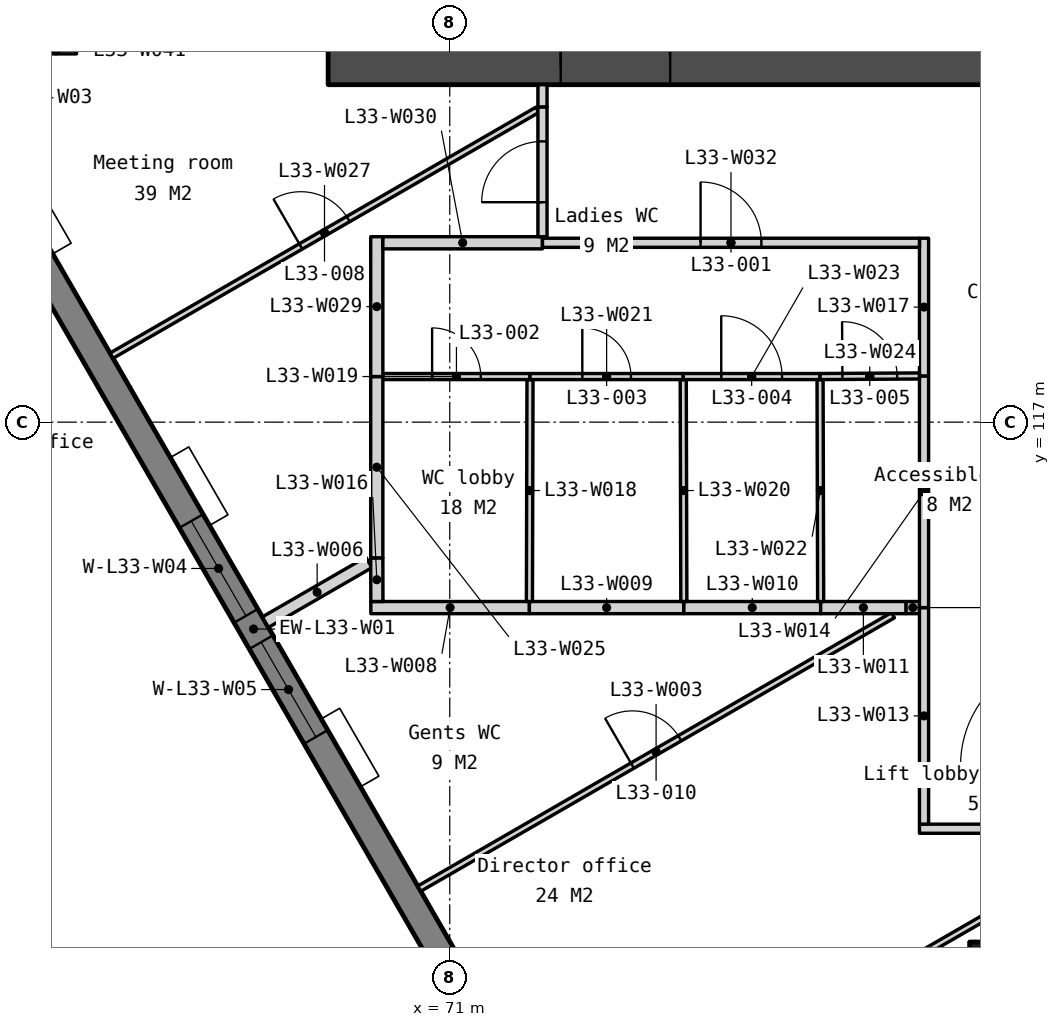
"""IFC4 building model, lengths in metres.
Left out: names, types, materials, properties, quantities, classifications, styles, units other than length and angle.
Written with IfcOpenShell. Run it as: python <this file> out.ifc"""

import sys

from ifc_helpers import new_model, si_unit, direction, frame, frame_2d, origin, origin_2d, place, context, subcontext, project, spatial, polyline, rectangle, outline, extrude, element, fill, save


model = new_model("IFC4")
c1 = context("Model", 3, precision=1e-05, world=origin(), true_north=direction((0.0, 1.0)))
c2 = subcontext(c1, "Body", "Model", "MODEL_VIEW")
j1 = project(units=[si_unit("LENGTHUNIT", "METRE"), si_unit("PLANEANGLEUNIT", "RADIAN")], contexts=[c1])
p1 = place(None, origin())
s1 = spatial("IfcSite", under=j1, at=p1, CompositionType="ELEMENT")
p2 = place(p1, origin())
s2 = spatial("IfcBuilding", under=s1, at=p2, CompositionType="ELEMENT")
p3 = place(p2, frame((0.0, 0.0, 132.5)))
s3 = spatial("IfcBuildingStorey", under=s2, at=p3, CompositionType="ELEMENT", Elevation=132.5)
p4 = place(p3, frame((80.0, 108.0, 0.0), z_axis=(0.0, 0.0, 1.0), x_axis=(1.0, 0.0, 0.0)))
e1 = element("IfcColumn", 1, at=p4, inside=s3, PredefinedType="COLUMN", context=c2, shape_type="SweptSolid", body=[
    extrude(rectangle(XDim=0.9, YDim=0.9, at=origin_2d()), origin(), (0.0, 0.0, 1.0), 3.9),
])
p5 = place(p3, frame((69.0, 122.85, 0.0), z_axis=(0.0, 0.0, 1.0), x_axis=(1.0, 0.0, 0.0)))
e2 = element("IfcWall", 2, at=p5, inside=s3, PredefinedType="SOLIDWALL", context=c2, shape_type="SweptSolid", body=[
    extrude(rectangle(XDim=22.0, YDim=0.6, at=frame_2d((11.0, 0.0))), origin(), (0.0, 0.0, 1.0), 3.75),
])
p6 = place(p5, frame((16.375, 0.0, 0.0)))
e3 = element("IfcOpeningElement", 3, at=p6, cuts=e2, PredefinedType="OPENING", context=c2, shape_type="SweptSolid", body=[
    extrude(rectangle(XDim=1.8, YDim=2.1, at=frame_2d((0.9, 1.05))), frame((0.0, 0.31, 0.0), z_axis=(0.0, -1.0, 0.0), x_axis=(1.0, 0.0, 0.0)), (0.0, 0.0, 1.0), 0.62),
])
p7 = place(p5, frame((3.825, 0.0, 0.0)))
e4 = element("IfcOpeningElement", 4, at=p7, cuts=e2, PredefinedType="OPENING", context=c2, shape_type="SweptSolid", body=[
    extrude(rectangle(XDim=1.8, YDim=2.1, at=frame_2d((0.9, 1.05))), frame((0.0, 0.31, 0.0), z_axis=(0.0, -1.0, 0.0), x_axis=(1.0, 0.0, 0.0)), (0.0, 0.0, 1.0), 0.62),
])
p8 = place(p5, frame((12.85, 0.0, 0.0)))
e5 = element("IfcOpeningElement", 5, at=p8, cuts=e2, PredefinedType="OPENING", context=c2, shape_type="SweptSolid", body=[
    extrude(rectangle(XDim=1.5, YDim=2.1, at=frame_2d((0.75, 1.05))), frame((0.0, 0.31, 0.0), z_axis=(0.0, -1.0, 0.0), x_axis=(1.0, 0.0, 0.0)), (0.0, 0.0, 1.0), 0.62),
])
p9 = place(p3, frame((57.652, 131.129, -0.15), z_axis=(0.0, 0.0, 1.0), x_axis=(0.499997369791, -0.866026922331, 0.0)))
e6 = element("IfcWall", 6, at=p9, inside=s3, PredefinedType="SOLIDWALL", context=c2, shape_type="SweptSolid", body=[
    extrude(outline(polyline([(40.486, 0.0), (40.486, 3.9), (0.0, 3.9), (0.0, 0.0), (40.486, 0.0)])), frame((0.0, 0.225, 0.0), z_axis=(0.0, -1.0, 0.0), x_axis=(1.0, 0.0, 0.0)), (0.0, 0.0, 1.0), 0.45),
])
p10 = place(p9, frame((0.837, 0.0, 0.95)))
e7 = element("IfcOpeningElement", 7, at=p10, cuts=e6, PredefinedType="OPENING", context=c2, shape_type="SweptSolid", body=[
    extrude(rectangle(XDim=1.2, YDim=2.2, at=frame_2d((0.6, 1.1))), frame((0.0, 0.235, 0.0), z_axis=(0.0, -1.0, 0.0), x_axis=(1.0, 0.0, 0.0)), (0.0, 0.0, 1.0), 0.47),
])
p11 = place(p9, frame((8.072, 0.0, 0.95)))
e8 = element("IfcOpeningElement", 8, at=p11, cuts=e6, PredefinedType="OPENING", context=c2, shape_type="SweptSolid", body=[
    extrude(rectangle(XDim=1.8, YDim=2.2, at=frame_2d((0.9, 1.1))), frame((0.0, 0.235, 0.0), z_axis=(0.0, -1.0, 0.0), x_axis=(1.0, 0.0, 0.0)), (0.0, 0.0, 1.0), 0.47),
])
p12 = place(p9, frame((10.372, 0.0, 0.95)))
e9 = element("IfcOpeningElement", 9, at=p12, cuts=e6, PredefinedType="OPENING", context=c2, shape_type="SweptSolid", body=[
    extrude(rectangle(XDim=1.8, YDim=2.2, at=frame_2d((0.9, 1.1))), frame((0.0, 0.235, 0.0), z_axis=(0.0, -1.0, 0.0), x_axis=(1.0, 0.0, 0.0)), (0.0, 0.0, 1.0), 0.47),
])
p13 = place(p9, frame((18.193, 0.0, 0.95)))
e10 = element("IfcOpeningElement", 10, at=p13, cuts=e6, PredefinedType="OPENING", context=c2, shape_type="SweptSolid", body=[
    extrude(rectangle(XDim=1.8, YDim=2.2, at=frame_2d((0.9, 1.1))), frame((0.0, 0.235, 0.0), z_axis=(0.0, -1.0, 0.0), x_axis=(1.0, 0.0, 0.0)), (0.0, 0.0, 1.0), 0.47),
])
p14 = place(p9, frame((20.493, 0.0, 0.95)))
e11 = element("IfcOpeningElement", 11, at=p14, cuts=e6, PredefinedType="OPENING", context=c2, shape_type="SweptSolid", body=[
    extrude(rectangle(XDim=1.8, YDim=2.2, at=frame_2d((0.9, 1.1))), frame((0.0, 0.235, 0.0), z_axis=(0.0, -1.0, 0.0), x_axis=(1.0, 0.0, 0.0)), (0.0, 0.0, 1.0), 0.47),
])
p15 = place(p9, frame((28.315, 0.0, 0.95)))
e12 = element("IfcOpeningElement", 12, at=p15, cuts=e6, PredefinedType="OPENING", context=c2, shape_type="SweptSolid", body=[
    extrude(rectangle(XDim=1.8, YDim=2.2, at=frame_2d((0.9, 1.1))), frame((0.0, 0.235, 0.0), z_axis=(0.0, -1.0, 0.0), x_axis=(1.0, 0.0, 0.0)), (0.0, 0.0, 1.0), 0.47),
])
p16 = place(p9, frame((30.615, 0.0, 0.95)))
e13 = element("IfcOpeningElement", 13, at=p16, cuts=e6, PredefinedType="OPENING", context=c2, shape_type="SweptSolid", body=[
    extrude(rectangle(XDim=1.8, YDim=2.2, at=frame_2d((0.9, 1.1))), frame((0.0, 0.235, 0.0), z_axis=(0.0, -1.0, 0.0), x_axis=(1.0, 0.0, 0.0)), (0.0, 0.0, 1.0), 0.47),
])
p17 = place(p9, frame((38.449, 0.0, 0.95)))
e14 = element("IfcOpeningElement", 14, at=p17, cuts=e6, PredefinedType="OPENING", context=c2, shape_type="SweptSolid", body=[
    extrude(rectangle(XDim=1.2, YDim=2.2, at=frame_2d((0.6, 1.1))), frame((0.0, 0.235, 0.0), z_axis=(0.0, -1.0, 0.0), x_axis=(1.0, 0.0, 0.0)), (0.0, 0.0, 1.0), 0.47),
])
p18 = place(p3, frame((73.029, 104.945, 0.0), z_axis=(0.0, 0.0, 1.0), x_axis=(0.866023222546, 0.500003777996, 0.0)))
e15 = element("IfcWall", 15, at=p18, inside=s3, PredefinedType="PARTITIONING", context=c2, shape_type="SweptSolid", body=[
    extrude(rectangle(XDim=7.963, YDim=0.1, at=frame_2d((3.981, 0.0))), origin(), (0.0, 0.0, 1.0), 3.75),
])
p19 = place(p3, frame((70.499, 109.327, 0.0), z_axis=(0.0, 0.0, 1.0), x_axis=(0.866019704065, 0.500009872074, 0.0)))
e16 = element("IfcWall", 16, at=p19, inside=s3, PredefinedType="PARTITIONING", context=c2, shape_type="SweptSolid", body=[
    extrude(rectangle(XDim=8.995, YDim=0.1, at=frame_2d((4.498, 0.0))), origin(), (0.0, 0.0, 1.0), 3.75),
])
p20 = place(p19, frame((4.048, 0.0, 0.0)))
e17 = element("IfcOpeningElement", 17, at=p20, cuts=e16, PredefinedType="OPENING", context=c2, shape_type="SweptSolid", body=[
    extrude(rectangle(XDim=0.9, YDim=2.1, at=frame_2d((0.45, 1.05))), frame((0.0, 0.06, 0.0), z_axis=(0.0, -1.0, 0.0), x_axis=(1.0, 0.0, 0.0)), (0.0, 0.0, 1.0), 0.12),
])
p21 = place(p3, frame((78.725, 110.313, 0.0), z_axis=(0.0, 0.0, 1.0), x_axis=(1.0, 0.0, 0.0)))
e18 = element("IfcWall", 18, at=p21, inside=s3, PredefinedType="PARTITIONING", context=c2, shape_type="SweptSolid", body=[
    extrude(rectangle(XDim=2.55, YDim=0.15, at=frame_2d((1.275, 0.0))), origin(), (0.0, 0.0, 1.0), 3.75),
])
p22 = place(p3, frame((67.968, 113.71, 0.0), z_axis=(0.0, 0.0, 1.0), x_axis=(0.866009734793, 0.500027138508, 0.0)))
e19 = element("IfcWall", 19, at=p22, inside=s3, PredefinedType="PARTITIONING", context=c2, shape_type="SweptSolid", body=[
    extrude(rectangle(XDim=1.965, YDim=0.2, at=frame_2d((0.983, 0.0))), origin(), (0.0, 0.0, 1.0), 3.75),
])
p23 = place(p3, frame((69.702, 113.95, 0.0), z_axis=(0.0, 0.0, 1.0), x_axis=(1.0, 0.0, 0.0)))
e20 = element("IfcWall", 20, at=p23, inside=s3, PredefinedType="PARTITIONING", context=c2, shape_type="SweptSolid", body=[
    extrude(rectangle(XDim=2.608, YDim=0.2, at=frame_2d((1.304, 0.0))), origin(), (0.0, 0.0, 1.0), 3.75),
])
p24 = place(p3, frame((72.31, 113.95, 0.0), z_axis=(0.0, 0.0, 1.0), x_axis=(1.0, 0.0, 0.0)))
e21 = element("IfcWall", 21, at=p24, inside=s3, PredefinedType="PARTITIONING", context=c2, shape_type="SweptSolid", body=[
    extrude(rectangle(XDim=2.54, YDim=0.2, at=frame_2d((1.27, 0.0))), origin(), (0.0, 0.0, 1.0), 3.75),
])
p25 = place(p3, frame((74.85, 113.95, 0.0), z_axis=(0.0, 0.0, 1.0), x_axis=(1.0, 0.0, 0.0)))
e22 = element("IfcWall", 22, at=p25, inside=s3, PredefinedType="PARTITIONING", context=c2, shape_type="SweptSolid", body=[
    extrude(rectangle(XDim=2.25, YDim=0.2, at=frame_2d((1.125, 0.0))), origin(), (0.0, 0.0, 1.0), 3.75),
])
p26 = place(p3, frame((77.1, 113.95, 0.0), z_axis=(0.0, 0.0, 1.0), x_axis=(1.0, 0.0, 0.0)))
e23 = element("IfcWall", 23, at=p26, inside=s3, PredefinedType="PARTITIONING", context=c2, shape_type="SweptSolid", body=[
    extrude(rectangle(XDim=1.405, YDim=0.2, at=frame_2d((0.702, 0.0))), origin(), (0.0, 0.0, 1.0), 3.75),
])
p27 = place(p3, frame((78.505, 113.95, 0.0), z_axis=(0.0, 0.0, 1.0), x_axis=(1.0, 0.0, 0.0)))
e24 = element("IfcWall", 24, at=p27, inside=s3, PredefinedType="PARTITIONING", context=c2, shape_type="SweptSolid", body=[
    extrude(rectangle(XDim=0.22, YDim=0.2, at=frame_2d((0.11, 0.0))), origin(), (0.0, 0.0, 1.0), 3.75),
])
p28 = place(p3, frame((78.8, 110.388, 0.0), z_axis=(0.0, 0.0, 1.0), x_axis=(0.0, 1.0, 0.0)))
e25 = element("IfcWall", 25, at=p28, inside=s3, PredefinedType="PARTITIONING", context=c2, shape_type="SweptSolid", body=[
    extrude(rectangle(XDim=3.562, YDim=0.15, at=frame_2d((1.781, 0.0))), origin(), (0.0, 0.0, 1.0), 3.75),
])
p29 = place(p3, frame((78.8, 113.95, 0.0), z_axis=(0.0, 0.0, 1.0), x_axis=(0.0, 1.0, 0.0)))
e26 = element("IfcWall", 26, at=p29, inside=s3, PredefinedType="PARTITIONING", context=c2, shape_type="SweptSolid", body=[
    extrude(rectangle(XDim=3.81, YDim=0.15, at=frame_2d((1.905, 0.0))), origin(), (0.0, 0.0, 1.0), 3.75),
])
p30 = place(p3, frame((69.802, 114.05, 0.0), z_axis=(0.0, 0.0, 1.0), x_axis=(-0.002380945632, 0.999997165545, 0.0)))
e27 = element("IfcWall", 27, at=p30, inside=s3, PredefinedType="PARTITIONING", context=c2, shape_type="SweptSolid", body=[
    extrude(rectangle(XDim=0.718, YDim=0.2, at=frame_2d((0.359, 0.0))), origin(), (0.0, 0.0, 1.0), 3.75),
])
p31 = place(p3, frame((78.8, 117.76, 0.0), z_axis=(0.0, 0.0, 1.0), x_axis=(0.0, 1.0, 0.0)))
e28 = element("IfcWall", 28, at=p31, inside=s3, PredefinedType="PARTITIONING", context=c2, shape_type="SweptSolid", body=[
    extrude(rectangle(XDim=2.265, YDim=0.15, at=frame_2d((1.132, 0.0))), origin(), (0.0, 0.0, 1.0), 3.75),
])
p32 = place(p3, frame((72.31, 114.05, 0.0), z_axis=(0.0, 0.0, 1.0), x_axis=(0.002608686776, 0.999996597371, 0.0)))
e29 = element("IfcWall", 29, at=p32, inside=s3, PredefinedType="PARTITIONING", context=c2, shape_type="SweptSolid", body=[
    extrude(rectangle(XDim=3.65, YDim=0.1, at=frame_2d((1.825, 0.0))), origin(), (0.0, 0.0, 1.0), 3.75),
])
p33 = place(p3, frame((69.9, 117.75, 0.0), z_axis=(0.0, 0.0, 1.0), x_axis=(1.0, 0.0, 0.0)))
e30 = element("IfcWall", 30, at=p33, inside=s3, PredefinedType="PARTITIONING", context=c2, shape_type="SweptSolid", body=[
    extrude(rectangle(XDim=2.42, YDim=0.1, at=frame_2d((1.21, 0.0))), origin(), (0.0, 0.0, 1.0), 3.75),
])
p34 = place(p33, frame((0.81, 0.0, 0.0)))
e31 = element("IfcOpeningElement", 31, at=p34, cuts=e30, PredefinedType="OPENING", context=c2, shape_type="SweptSolid", body=[
    extrude(rectangle(XDim=0.8, YDim=2.1, at=frame_2d((0.4, 1.05))), frame((0.0, 0.06, 0.0), z_axis=(0.0, -1.0, 0.0), x_axis=(1.0, 0.0, 0.0)), (0.0, 0.0, 1.0), 0.12),
])
p35 = place(p3, frame((74.85, 114.05, 0.0), z_axis=(0.0, 0.0, 1.0), x_axis=(-0.002675575707, 0.999996420641, 0.0)))
e32 = element("IfcWall", 32, at=p35, inside=s3, PredefinedType="PARTITIONING", context=c2, shape_type="SweptSolid", body=[
    extrude(rectangle(XDim=3.65, YDim=0.1, at=frame_2d((1.825, 0.0))), origin(), (0.0, 0.0, 1.0), 3.75),
])
p36 = place(p3, frame((72.32, 117.75, 0.0), z_axis=(0.0, 0.0, 1.0), x_axis=(1.0, 0.0, 0.0)))
e33 = element("IfcWall", 33, at=p36, inside=s3, PredefinedType="PARTITIONING", context=c2, shape_type="SweptSolid", body=[
    extrude(rectangle(XDim=2.52, YDim=0.1, at=frame_2d((1.26, 0.0))), origin(), (0.0, 0.0, 1.0), 3.75),
])
p37 = place(p36, frame((0.86, 0.0, 0.0)))
e34 = element("IfcOpeningElement", 34, at=p37, cuts=e33, PredefinedType="OPENING", context=c2, shape_type="SweptSolid", body=[
    extrude(rectangle(XDim=0.8, YDim=2.1, at=frame_2d((0.4, 1.05))), frame((0.0, 0.06, 0.0), z_axis=(0.0, -1.0, 0.0), x_axis=(1.0, 0.0, 0.0)), (0.0, 0.0, 1.0), 0.12),
])
p38 = place(p3, frame((77.1, 114.05, 0.0), z_axis=(0.0, 0.0, 1.0), x_axis=(-0.002675575707, 0.999996420641, 0.0)))
e35 = element("IfcWall", 35, at=p38, inside=s3, PredefinedType="PARTITIONING", context=c2, shape_type="SweptSolid", body=[
    extrude(rectangle(XDim=3.65, YDim=0.1, at=frame_2d((1.825, 0.0))), origin(), (0.0, 0.0, 1.0), 3.75),
])
p39 = place(p3, frame((74.84, 117.75, 0.0), z_axis=(0.0, 0.0, 1.0), x_axis=(1.0, 0.0, 0.0)))
e36 = element("IfcWall", 36, at=p39, inside=s3, PredefinedType="PARTITIONING", context=c2, shape_type="SweptSolid", body=[
    extrude(rectangle(XDim=2.25, YDim=0.1, at=frame_2d((1.125, 0.0))), origin(), (0.0, 0.0, 1.0), 3.75),
])
p40 = place(p39, frame((0.625, 0.0, 0.0)))
e37 = element("IfcOpeningElement", 37, at=p40, cuts=e36, PredefinedType="OPENING", context=c2, shape_type="SweptSolid", body=[
    extrude(rectangle(XDim=1.0, YDim=2.1, at=frame_2d((0.5, 1.05))), frame((0.0, 0.06, 0.0), z_axis=(0.0, -1.0, 0.0), x_axis=(1.0, 0.0, 0.0)), (0.0, 0.0, 1.0), 0.12),
])
p41 = place(p3, frame((77.09, 117.75, 0.0), z_axis=(0.0, 0.0, 1.0), x_axis=(0.999983043837, 0.005823404317, 0.0)))
e38 = element("IfcWall", 38, at=p41, inside=s3, PredefinedType="PARTITIONING", context=c2, shape_type="SweptSolid", body=[
    extrude(rectangle(XDim=1.635, YDim=0.1, at=frame_2d((0.817, 0.0))), origin(), (0.0, 0.0, 1.0), 3.75),
])
p42 = place(p41, frame((0.367, 0.0, 0.0)))
e39 = element("IfcOpeningElement", 39, at=p42, cuts=e38, PredefinedType="OPENING", context=c2, shape_type="SweptSolid", body=[
    extrude(rectangle(XDim=0.9, YDim=2.1, at=frame_2d((0.45, 1.05))), frame((0.0, 0.06, 0.0), z_axis=(0.0, -1.0, 0.0), x_axis=(1.0, 0.0, 0.0)), (0.0, 0.0, 1.0), 0.12),
])
p43 = place(p3, frame((69.8, 114.768, 0.0), z_axis=(0.0, 0.0, 1.0), x_axis=(0.0, 1.0, 0.0)))
e40 = element("IfcWall", 40, at=p43, inside=s3, PredefinedType="PARTITIONING", context=c2, shape_type="SweptSolid", body=[
    extrude(rectangle(XDim=2.982, YDim=0.2, at=frame_2d((1.491, 0.0))), origin(), (0.0, 0.0, 1.0), 3.75),
])
p44 = place(p3, frame((65.438, 118.093, 0.0), z_axis=(0.0, 0.0, 1.0), x_axis=(0.866029768103, 0.499992440702, 0.0)))
e41 = element("IfcWall", 41, at=p44, inside=s3, PredefinedType="PARTITIONING", context=c2, shape_type="SweptSolid", body=[
    extrude(rectangle(XDim=8.089, YDim=0.1, at=frame_2d((4.044, 0.0))), origin(), (0.0, 0.0, 1.0), 3.75),
])
p45 = place(p44, frame((3.594, 0.0, 0.0)))
e42 = element("IfcOpeningElement", 42, at=p45, cuts=e41, PredefinedType="OPENING", context=c2, shape_type="SweptSolid", body=[
    extrude(rectangle(XDim=0.9, YDim=2.1, at=frame_2d((0.45, 1.05))), frame((0.0, 0.06, 0.0), z_axis=(0.0, -1.0, 0.0), x_axis=(1.0, 0.0, 0.0)), (0.0, 0.0, 1.0), 0.12),
])
p46 = place(p3, frame((69.8, 117.75, 0.0), z_axis=(0.0, 0.0, 1.0), x_axis=(0.0, 1.0, 0.0)))
e43 = element("IfcWall", 43, at=p46, inside=s3, PredefinedType="PARTITIONING", context=c2, shape_type="SweptSolid", body=[
    extrude(rectangle(XDim=2.3, YDim=0.2, at=frame_2d((1.15, 0.0))), origin(), (0.0, 0.0, 1.0), 3.75),
])
p47 = place(p3, frame((69.9, 119.95, 0.0), z_axis=(0.0, 0.0, 1.0), x_axis=(1.0, 0.0, 0.0)))
e44 = element("IfcWall", 44, at=p47, inside=s3, PredefinedType="PARTITIONING", context=c2, shape_type="SweptSolid", body=[
    extrude(rectangle(XDim=2.625, YDim=0.2, at=frame_2d((1.312, 0.0))), origin(), (0.0, 0.0, 1.0), 3.75),
])
p48 = place(p3, frame((72.525, 120.05, 0.0), z_axis=(0.0, 0.0, 1.0), x_axis=(0.0, 1.0, 0.0)))
e45 = element("IfcWall", 45, at=p48, inside=s3, PredefinedType="PARTITIONING", context=c2, shape_type="SweptSolid", body=[
    extrude(rectangle(XDim=2.135, YDim=0.15, at=frame_2d((1.067, 0.0))), origin(), (0.0, 0.0, 1.0), 3.75),
])
p49 = place(p48, frame((0.567, 0.0, 0.0)))
e46 = element("IfcOpeningElement", 46, at=p49, cuts=e45, PredefinedType="OPENING", context=c2, shape_type="SweptSolid", body=[
    extrude(rectangle(XDim=1.0, YDim=2.1, at=frame_2d((0.5, 1.05))), frame((0.0, 0.085, 0.0), z_axis=(0.0, -1.0, 0.0), x_axis=(1.0, 0.0, 0.0)), (0.0, 0.0, 1.0), 0.17),
])
p50 = place(p3, frame((72.525, 119.95, 0.0), z_axis=(0.0, 0.0, 1.0), x_axis=(1.0, 0.0, 0.0)))
e47 = element("IfcWall", 47, at=p50, inside=s3, PredefinedType="PARTITIONING", context=c2, shape_type="SweptSolid", body=[
    extrude(rectangle(XDim=6.2, YDim=0.15, at=frame_2d((3.1, 0.0))), origin(), (0.0, 0.0, 1.0), 3.75),
])
p51 = place(p50, frame((2.6, 0.0, 0.0)))
e48 = element("IfcOpeningElement", 48, at=p51, cuts=e47, PredefinedType="OPENING", context=c2, shape_type="SweptSolid", body=[
    extrude(rectangle(XDim=1.0, YDim=2.1, at=frame_2d((0.5, 1.05))), frame((0.0, 0.085, 0.0), z_axis=(0.0, -1.0, 0.0), x_axis=(1.0, 0.0, 0.0)), (0.0, 0.0, 1.0), 0.17),
])
p52 = place(p3, frame((72.525, 122.185, 0.0), z_axis=(0.0, 0.0, 1.0), x_axis=(0.0, 1.0, 0.0)))
e49 = element("IfcWall", 49, at=p52, inside=s3, PredefinedType="PARTITIONING", context=c2, shape_type="SweptSolid", body=[
    extrude(rectangle(XDim=0.365, YDim=0.15, at=frame_2d((0.183, 0.0))), origin(), (0.0, 0.0, 1.0), 3.75),
])
p53 = place(p3, frame((64.187, 123.106, 0.0), z_axis=(0.0, 0.0, 1.0), x_axis=(0.999999934552, 0.000361794477, 0.0)))
e50 = element("IfcWall", 50, at=p53, inside=s3, PredefinedType="PARTITIONING", context=c2, shape_type="SweptSolid", body=[
    extrude(rectangle(XDim=0.675, YDim=0.1, at=frame_2d((0.337, 0.0))), origin(), (0.0, 0.0, 1.0), 3.75),
])
p54 = place(p7, origin())
e51 = element("IfcDoor", 51, at=p54, inside=s3, OperationType="DOUBLE_DOOR_DOUBLE_SWING", PredefinedType="DOOR", context=c2, shape_type="SweptSolid", body=[
    extrude(rectangle(XDim=1.8, YDim=2.1, at=frame_2d((0.9, 1.05))), frame((0.0, 0.025, 0.0), z_axis=(0.0, -1.0, 0.0), x_axis=(1.0, 0.0, 0.0)), (0.0, 0.0, 1.0), 0.05),
])
fill(e4, e51)
p55 = place(p13, origin())
e52 = element("IfcWindow", 52, at=p55, inside=s3, PartitioningType="SINGLE_PANEL", PredefinedType="WINDOW", context=c2, shape_type="SweptSolid", body=[
    extrude(rectangle(XDim=1.8, YDim=2.2, at=frame_2d((0.9, 1.1))), frame((0.0, 0.03, 0.0), z_axis=(0.0, -1.0, 0.0), x_axis=(1.0, 0.0, 0.0)), (0.0, 0.0, 1.0), 0.06),
])
fill(e10, e52)
p56 = place(p14, origin())
e53 = element("IfcWindow", 53, at=p56, inside=s3, PartitioningType="SINGLE_PANEL", PredefinedType="WINDOW", context=c2, shape_type="SweptSolid", body=[
    extrude(rectangle(XDim=1.8, YDim=2.2, at=frame_2d((0.9, 1.1))), frame((0.0, 0.03, 0.0), z_axis=(0.0, -1.0, 0.0), x_axis=(1.0, 0.0, 0.0)), (0.0, 0.0, 1.0), 0.06),
])
fill(e11, e53)
p57 = place(p51, origin())
e54 = element("IfcDoor", 54, at=p57, inside=s3, OperationType="SINGLE_SWING_LEFT", PredefinedType="DOOR", context=c2, shape_type="SweptSolid", body=[
    extrude(rectangle(XDim=1.0, YDim=2.1, at=frame_2d((0.5, 1.05))), frame((0.0, 0.025, 0.0), z_axis=(0.0, -1.0, 0.0), x_axis=(1.0, 0.0, 0.0)), (0.0, 0.0, 1.0), 0.05),
])
fill(e48, e54)
p58 = place(p34, origin())
e55 = element("IfcDoor", 55, at=p58, inside=s3, OperationType="SINGLE_SWING_LEFT", PredefinedType="DOOR", context=c2, shape_type="SweptSolid", body=[
    extrude(rectangle(XDim=0.8, YDim=2.1, at=frame_2d((0.4, 1.05))), frame((0.0, 0.025, 0.0), z_axis=(0.0, -1.0, 0.0), x_axis=(1.0, 0.0, 0.0)), (0.0, 0.0, 1.0), 0.05),
])
fill(e31, e55)
p59 = place(p37, origin())
e56 = element("IfcDoor", 56, at=p59, inside=s3, OperationType="SINGLE_SWING_LEFT", PredefinedType="DOOR", context=c2, shape_type="SweptSolid", body=[
    extrude(rectangle(XDim=0.8, YDim=2.1, at=frame_2d((0.4, 1.05))), frame((0.0, 0.025, 0.0), z_axis=(0.0, -1.0, 0.0), x_axis=(1.0, 0.0, 0.0)), (0.0, 0.0, 1.0), 0.05),
])
fill(e34, e56)
p60 = place(p40, origin())
e57 = element("IfcDoor", 57, at=p60, inside=s3, OperationType="SINGLE_SWING_LEFT", PredefinedType="DOOR", context=c2, shape_type="SweptSolid", body=[
    extrude(rectangle(XDim=1.0, YDim=2.1, at=frame_2d((0.5, 1.05))), frame((0.0, 0.025, 0.0), z_axis=(0.0, -1.0, 0.0), x_axis=(1.0, 0.0, 0.0)), (0.0, 0.0, 1.0), 0.05),
])
fill(e37, e57)
p61 = place(p42, origin())
e58 = element("IfcDoor", 58, at=p61, inside=s3, OperationType="SINGLE_SWING_LEFT", PredefinedType="DOOR", context=c2, shape_type="SweptSolid", body=[
    extrude(rectangle(XDim=0.9, YDim=2.1, at=frame_2d((0.45, 1.05))), frame((0.0, 0.025, 0.0), z_axis=(0.0, -1.0, 0.0), x_axis=(1.0, 0.0, 0.0)), (0.0, 0.0, 1.0), 0.05),
])
fill(e39, e58)
p62 = place(p45, origin())
e59 = element("IfcDoor", 59, at=p62, inside=s3, OperationType="SINGLE_SWING_LEFT", PredefinedType="DOOR", context=c2, shape_type="SweptSolid", body=[
    extrude(rectangle(XDim=0.9, YDim=2.1, at=frame_2d((0.45, 1.05))), frame((0.0, 0.025, 0.0), z_axis=(0.0, -1.0, 0.0), x_axis=(1.0, 0.0, 0.0)), (0.0, 0.0, 1.0), 0.05),
])
fill(e42, e59)
p63 = place(p49, origin())
e60 = element("IfcDoor", 60, at=p63, inside=s3, OperationType="SINGLE_SWING_LEFT", PredefinedType="DOOR", context=c2, shape_type="SweptSolid", body=[
    extrude(rectangle(XDim=1.0, YDim=2.1, at=frame_2d((0.5, 1.05))), frame((0.0, 0.025, 0.0), z_axis=(0.0, -1.0, 0.0), x_axis=(1.0, 0.0, 0.0)), (0.0, 0.0, 1.0), 0.05),
])
fill(e46, e60)
p64 = place(p20, origin())
e61 = element("IfcDoor", 61, at=p64, inside=s3, OperationType="SINGLE_SWING_LEFT", PredefinedType="DOOR", context=c2, shape_type="SweptSolid", body=[
    extrude(rectangle(XDim=0.9, YDim=2.1, at=frame_2d((0.45, 1.05))), frame((0.0, 0.025, 0.0), z_axis=(0.0, -1.0, 0.0), x_axis=(1.0, 0.0, 0.0)), (0.0, 0.0, 1.0), 0.05),
])
fill(e17, e61)
save(model, sys.argv[1])
